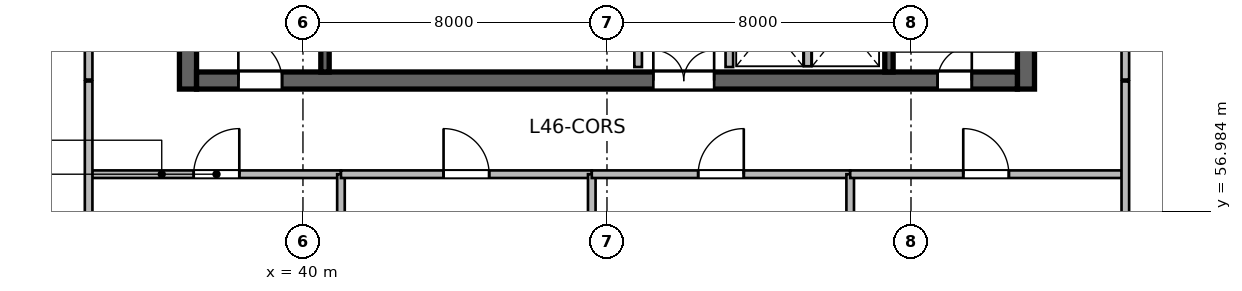
"""IFC4 building model, lengths in metres.
Left out: names, types, materials, properties, quantities, classifications, styles, units other than length and angle.
Written with IfcOpenShell. Run it as: python <this file> out.ifc"""

import sys

from ifc_helpers import new_model, si_unit, direction, frame, frame_2d, origin, place, context, subcontext, project, spatial, rectangle, extrude, source, transform, mapped, element, fill, save


model = new_model("IFC4")
c1 = context("Model", 3, precision=1e-05, world=origin(), true_north=direction((0.0, 1.0)))
c2 = subcontext(c1, "Body", "Model", "MODEL_VIEW")
j1 = project(units=[si_unit("LENGTHUNIT", "METRE"), si_unit("PLANEANGLEUNIT", "RADIAN")], contexts=[c1])
p1 = place(None, origin())
s1 = spatial("IfcSite", under=j1, at=p1, CompositionType="ELEMENT")
p2 = place(p1, origin())
s2 = spatial("IfcBuilding", under=s1, at=p2, CompositionType="ELEMENT")
p3 = place(p2, frame((0.0, 0.0, 189.6)))
s3 = spatial("IfcBuildingStorey", under=s2, at=p3, CompositionType="ELEMENT", Elevation=189.6)
m1 = source(origin(), c2, "Body", "SweptSolid", [
    extrude(rectangle(XDim=12.0, YDim=0.45, at=frame_2d((6.0, 0.0))), origin(), (0.0, 0.0, 1.0), 4.8),
])
for number, where, z_axis, x_axis in (
    (1, (36.975, 60.2, 0.0), (0.0, 0.0, 1.0), (0.0, 1.0, 0.0)),
    (2, (59.025, 60.2, 0.0), (0.0, 0.0, 1.0), (0.0, 1.0, 0.0)),
):
    element("IfcWall", number, at=place(p3, frame(where, z_axis=z_axis, x_axis=x_axis)), inside=s3, PredefinedType="SHEAR", context=c2, shape_type="MappedRepresentation", body=[
        mapped(m1, transform((0.0, 0.0, 0.0), scale=1.0)),
    ])
m2 = source(origin(), c2, "Body", "SweptSolid", [
    extrude(rectangle(XDim=21.6, YDim=0.45, at=frame_2d((10.8, 0.0))), origin(), (0.0, 0.0, 1.0), 4.8),
])
p4 = place(p3, frame((37.2, 60.425, 0.0), z_axis=(0.0, 0.0, 1.0), x_axis=(1.0, 0.0, 0.0)))
e3 = element("IfcWall", 3, at=p4, inside=s3, PredefinedType="SHEAR", context=c2, shape_type="MappedRepresentation", body=[
    mapped(m2, transform((0.0, 0.0, 0.0), scale=1.0)),
])
p5 = place(p4, frame((1.1, 0.0, 0.0)))
e4 = element("IfcOpeningElement", 4, at=p5, cuts=e3, PredefinedType="OPENING", context=c2, shape_type="SweptSolid", body=[
    extrude(rectangle(XDim=1.15, YDim=2.15, at=frame_2d((0.575, 1.075))), frame((0.0, 0.235, 0.0), z_axis=(0.0, -1.0, 0.0), x_axis=(1.0, 0.0, 0.0)), (0.0, 0.0, 1.0), 0.47),
])
p6 = place(p4, frame((19.5, 0.0, 0.0)))
e5 = element("IfcOpeningElement", 5, at=p6, cuts=e3, PredefinedType="OPENING", context=c2, shape_type="SweptSolid", body=[
    extrude(rectangle(XDim=0.9, YDim=2.1, at=frame_2d((0.45, 1.05))), frame((0.0, 0.235, 0.0), z_axis=(0.0, -1.0, 0.0), x_axis=(1.0, 0.0, 0.0)), (0.0, 0.0, 1.0), 0.47),
])
p7 = place(p4, frame((12.02, 0.0, 0.0)))
e6 = element("IfcOpeningElement", 6, at=p7, cuts=e3, PredefinedType="OPENING", context=c2, shape_type="SweptSolid", body=[
    extrude(rectangle(XDim=1.6, YDim=2.15, at=frame_2d((0.8, 1.075))), frame((0.0, 0.235, 0.0), z_axis=(0.0, -1.0, 0.0), x_axis=(1.0, 0.0, 0.0)), (0.0, 0.0, 1.0), 0.47),
])
m3 = source(origin(), c2, "Body", "SweptSolid", [
    extrude(rectangle(XDim=11.1, YDim=0.22, at=frame_2d((5.55, 0.0))), origin(), (0.0, 0.0, 1.0), 4.8),
])
p8 = place(p3, frame((40.58, 60.65, 0.0), z_axis=(0.0, 0.0, 1.0), x_axis=(0.0, 1.0, 0.0)))
e7 = element("IfcWall", 7, at=p8, inside=s3, PredefinedType="SHEAR", context=c2, shape_type="MappedRepresentation", body=[
    mapped(m3, transform((0.0, 0.0, 0.0), scale=1.0)),
])
p9 = place(p3, frame((55.42, 60.65, 0.0), z_axis=(0.0, 0.0, 1.0), x_axis=(0.0, 1.0, 0.0)))
e8 = element("IfcWall", 8, at=p9, inside=s3, PredefinedType="SHEAR", context=c2, shape_type="MappedRepresentation", body=[
    mapped(m3, transform((0.0, 0.0, 0.0), scale=1.0)),
])
p10 = place(p9, frame((9.595, 0.0, 0.0)))
e9 = element("IfcOpeningElement", 9, at=p10, cuts=e8, PredefinedType="OPENING", context=c2, shape_type="SweptSolid", body=[
    extrude(rectangle(XDim=1.15, YDim=2.15, at=frame_2d((0.575, 1.075))), frame((0.0, 0.12, 0.0), z_axis=(0.0, -1.0, 0.0), x_axis=(1.0, 0.0, 0.0)), (0.0, 0.0, 1.0), 0.24),
])
m4 = source(origin(), c2, "Body", "SweptSolid", [
    extrude(rectangle(XDim=2.24, YDim=0.2, at=frame_2d((1.12, 0.0))), origin(), (0.0, 0.0, 1.0), 4.48),
])
for number, where, z_axis, x_axis in (
    (10, (48.82, 60.78, 0.0), (0.0, 0.0, 1.0), (0.0, 1.0, 0.0)),
    (11, (51.22, 60.78, 0.0), (0.0, 0.0, 1.0), (0.0, 1.0, 0.0)),
):
    element("IfcWall", number, at=place(p3, frame(where, z_axis=z_axis, x_axis=x_axis)), inside=s3, PredefinedType="SOLIDWALL", context=c2, shape_type="MappedRepresentation", body=[
        mapped(m4, transform((0.0, 0.0, 0.0), scale=1.0)),
    ])
m5 = source(origin(), c2, "Body", "SweptSolid", [
    extrude(rectangle(XDim=2.2, YDim=0.2, at=frame_2d((1.1, 0.0))), origin(), (0.0, 0.0, 1.0), 4.48),
])
p11 = place(p3, frame((53.28, 60.8, 0.0), z_axis=(0.0, 0.0, 1.0), x_axis=(0.0, 1.0, 0.0)))
e12 = element("IfcWall", 12, at=p11, inside=s3, PredefinedType="SOLIDWALL", context=c2, shape_type="MappedRepresentation", body=[
    mapped(m5, transform((0.0, 0.0, 0.0), scale=1.0)),
])
m6 = source(origin(), c2, "Body", "SweptSolid", [
    extrude(rectangle(XDim=6.55, YDim=0.2, at=frame_2d((3.275, 0.0))), origin(), (0.0, 0.0, 1.0), 4.48),
])
p12 = place(p3, frame((34.45, 57.96, 0.0), z_axis=(0.0, 0.0, 1.0), x_axis=(1.0, 0.0, 0.0)))
e13 = element("IfcWall", 13, at=p12, inside=s3, PredefinedType="SOLIDWALL", context=c2, shape_type="MappedRepresentation", body=[
    mapped(m6, transform((0.0, 0.0, 0.0), scale=1.0)),
])
p13 = place(p12, frame((2.675, 0.0, 0.0)))
e14 = element("IfcOpeningElement", 14, at=p13, cuts=e13, PredefinedType="OPENING", context=c2, shape_type="SweptSolid", body=[
    extrude(rectangle(XDim=1.2, YDim=2.15, at=frame_2d((0.6, 1.075))), frame((0.0, 0.11, 0.0), z_axis=(0.0, -1.0, 0.0), x_axis=(1.0, 0.0, 0.0)), (0.0, 0.0, 1.0), 0.22),
])
m7 = source(origin(), c2, "Body", "SweptSolid", [
    extrude(rectangle(XDim=5.562, YDim=0.2, at=frame_2d((2.781, 0.0))), origin(), (0.0, 0.0, 1.0), 4.48),
])
p14 = place(p3, frame((41.0, 52.398, 0.0), z_axis=(0.0, 0.0, 1.0), x_axis=(0.0, 1.0, 0.0)))
e15 = element("IfcWall", 15, at=p14, inside=s3, PredefinedType="SOLIDWALL", context=c2, shape_type="MappedRepresentation", body=[
    mapped(m7, transform((0.0, 0.0, 0.0), scale=1.0)),
])
m8 = source(origin(), c2, "Body", "SweptSolid", [
    extrude(rectangle(XDim=6.6, YDim=0.2, at=frame_2d((3.3, 0.0))), origin(), (0.0, 0.0, 1.0), 3.925),
])
p15 = place(p3, frame((41.0, 57.96, 0.0), z_axis=(0.0, 0.0, 1.0), x_axis=(1.0, 0.0, 0.0)))
e16 = element("IfcWall", 16, at=p15, inside=s3, PredefinedType="SOLIDWALL", context=c2, shape_type="MappedRepresentation", body=[
    mapped(m8, transform((0.0, 0.0, 0.0), scale=1.0)),
])
p16 = place(p15, frame((2.7, 0.0, 0.0)))
e17 = element("IfcOpeningElement", 17, at=p16, cuts=e16, PredefinedType="OPENING", context=c2, shape_type="SweptSolid", body=[
    extrude(rectangle(XDim=1.2, YDim=2.15, at=frame_2d((0.6, 1.075))), frame((0.0, 0.11, 0.0), z_axis=(0.0, -1.0, 0.0), x_axis=(1.0, 0.0, 0.0)), (0.0, 0.0, 1.0), 0.22),
])
m9 = source(origin(), c2, "Body", "SweptSolid", [
    extrude(rectangle(XDim=4.173, YDim=0.2, at=frame_2d((2.086, 0.0))), origin(), (0.0, 0.0, 1.0), 4.48),
])
p17 = place(p3, frame((47.6, 53.787, 0.0), z_axis=(0.0, 0.0, 1.0), x_axis=(0.0, 1.0, 0.0)))
e18 = element("IfcWall", 18, at=p17, inside=s3, PredefinedType="SOLIDWALL", context=c2, shape_type="MappedRepresentation", body=[
    mapped(m9, transform((0.0, 0.0, 0.0), scale=1.0)),
])
m10 = source(origin(), c2, "Body", "SweptSolid", [
    extrude(rectangle(XDim=6.8, YDim=0.2, at=frame_2d((3.4, 0.0))), origin(), (0.0, 0.0, 1.0), 3.925),
])
p18 = place(p3, frame((47.6, 57.96, 0.0), z_axis=(0.0, 0.0, 1.0), x_axis=(1.0, 0.0, 0.0)))
e19 = element("IfcWall", 19, at=p18, inside=s3, PredefinedType="SOLIDWALL", context=c2, shape_type="MappedRepresentation", body=[
    mapped(m10, transform((0.0, 0.0, 0.0), scale=1.0)),
])
p19 = place(p18, frame((2.8, 0.0, 0.0)))
e20 = element("IfcOpeningElement", 20, at=p19, cuts=e19, PredefinedType="OPENING", context=c2, shape_type="SweptSolid", body=[
    extrude(rectangle(XDim=1.2, YDim=2.15, at=frame_2d((0.6, 1.075))), frame((0.0, 0.11, 0.0), z_axis=(0.0, -1.0, 0.0), x_axis=(1.0, 0.0, 0.0)), (0.0, 0.0, 1.0), 0.22),
])
m11 = source(origin(), c2, "Body", "SweptSolid", [
    extrude(rectangle(XDim=5.354, YDim=0.2, at=frame_2d((2.677, 0.0))), origin(), (0.0, 0.0, 1.0), 4.48),
])
p20 = place(p3, frame((54.4, 52.606, 0.0), z_axis=(0.0, 0.0, 1.0), x_axis=(0.0, 1.0, 0.0)))
e21 = element("IfcWall", 21, at=p20, inside=s3, PredefinedType="SOLIDWALL", context=c2, shape_type="MappedRepresentation", body=[
    mapped(m11, transform((0.0, 0.0, 0.0), scale=1.0)),
])
m12 = source(origin(), c2, "Body", "SweptSolid", [
    extrude(rectangle(XDim=7.15, YDim=0.2, at=frame_2d((3.575, 0.0))), origin(), (0.0, 0.0, 1.0), 3.925),
])
p21 = place(p3, frame((54.4, 57.96, 0.0), z_axis=(0.0, 0.0, 1.0), x_axis=(1.0, 0.0, 0.0)))
e22 = element("IfcWall", 22, at=p21, inside=s3, PredefinedType="SOLIDWALL", context=c2, shape_type="MappedRepresentation", body=[
    mapped(m12, transform((0.0, 0.0, 0.0), scale=1.0)),
])
p22 = place(p21, frame((2.975, 0.0, 0.0)))
e23 = element("IfcOpeningElement", 23, at=p22, cuts=e22, PredefinedType="OPENING", context=c2, shape_type="SweptSolid", body=[
    extrude(rectangle(XDim=1.2, YDim=2.15, at=frame_2d((0.6, 1.075))), frame((0.0, 0.11, 0.0), z_axis=(0.0, -1.0, 0.0), x_axis=(1.0, 0.0, 0.0)), (0.0, 0.0, 1.0), 0.22),
])
m13 = source(origin(), c2, "Body", "SweptSolid", [
    extrude(rectangle(XDim=12.336, YDim=0.2, at=frame_2d((6.168, 0.0))), origin(), (0.0, 0.0, 1.0), 4.48),
])
p23 = place(p3, frame((34.36, 48.064, 0.0), z_axis=(0.0, 0.0, 1.0), x_axis=(0.0, 1.0, 0.0)))
e24 = element("IfcWall", 24, at=p23, inside=s3, PredefinedType="SOLIDWALL", context=c2, shape_type="MappedRepresentation", body=[
    mapped(m13, transform((0.0, 0.0, 0.0), scale=1.0)),
])
m14 = source(origin(), c2, "Body", "SweptSolid", [
    extrude(rectangle(XDim=5.05, YDim=0.2, at=frame_2d((2.525, 0.0))), origin(), (0.0, 0.0, 1.0), 4.48),
])
p24 = place(p3, frame((34.36, 60.45, 0.0), z_axis=(0.0, 0.0, 1.0), x_axis=(0.0, 1.0, 0.0)))
e25 = element("IfcWall", 25, at=p24, inside=s3, PredefinedType="SOLIDWALL", context=c2, shape_type="MappedRepresentation", body=[
    mapped(m14, transform((0.0, 0.0, 0.0), scale=1.0)),
])
p25 = place(p24, frame((1.925, 0.0, 0.0)))
e26 = element("IfcOpeningElement", 26, at=p25, cuts=e25, PredefinedType="OPENING", context=c2, shape_type="SweptSolid", body=[
    extrude(rectangle(XDim=1.2, YDim=2.15, at=frame_2d((0.6, 1.075))), frame((0.0, 0.11, 0.0), z_axis=(0.0, -1.0, 0.0), x_axis=(1.0, 0.0, 0.0)), (0.0, 0.0, 1.0), 0.22),
])
m15 = source(origin(), c2, "Body", "SweptSolid", [
    extrude(rectangle(XDim=12.336, YDim=0.2, at=frame_2d((6.168, 0.0))), origin(), (0.0, 0.0, 1.0), 3.772),
])
p26 = place(p3, frame((61.64, 48.064, 0.0), z_axis=(0.0, 0.0, 1.0), x_axis=(0.0, 1.0, 0.0)))
e27 = element("IfcWall", 27, at=p26, inside=s3, PredefinedType="SOLIDWALL", context=c2, shape_type="MappedRepresentation", body=[
    mapped(m15, transform((0.0, 0.0, 0.0), scale=1.0)),
])
p27 = place(p3, frame((61.64, 60.45, 0.0), z_axis=(0.0, 0.0, 1.0), x_axis=(0.0, 1.0, 0.0)))
e28 = element("IfcWall", 28, at=p27, inside=s3, PredefinedType="SOLIDWALL", context=c2, shape_type="MappedRepresentation", body=[
    mapped(m14, transform((0.0, 0.0, 0.0), scale=1.0)),
])
p28 = place(p27, frame((1.925, 0.0, 0.0)))
e29 = element("IfcOpeningElement", 29, at=p28, cuts=e28, PredefinedType="OPENING", context=c2, shape_type="SweptSolid", body=[
    extrude(rectangle(XDim=1.2, YDim=2.15, at=frame_2d((0.6, 1.075))), frame((0.0, 0.11, 0.0), z_axis=(0.0, -1.0, 0.0), x_axis=(1.0, 0.0, 0.0)), (0.0, 0.0, 1.0), 0.22),
])
m16 = source(origin(), c2, "Body", "SweptSolid", [
    extrude(rectangle(XDim=1.15, YDim=2.15, at=frame_2d((0.575, 1.075))), frame((0.0, 0.025, 0.0), z_axis=(0.0, -1.0, 0.0), x_axis=(1.0, 0.0, 0.0)), (0.0, 0.0, 1.0), 0.05),
])
p29 = place(p5, origin())
e30 = element("IfcDoor", 30, at=p29, inside=s3, OperationType="SINGLE_SWING_LEFT", PredefinedType="DOOR", context=c2, shape_type="MappedRepresentation", body=[
    mapped(m16, transform((0.0, 0.0, 0.0), scale=1.0)),
])
fill(e4, e30)
m17 = source(origin(), c2, "Body", "SweptSolid", [
    extrude(rectangle(XDim=0.9, YDim=2.1, at=frame_2d((0.45, 1.05))), frame((0.0, 0.025, 0.0), z_axis=(0.0, -1.0, 0.0), x_axis=(1.0, 0.0, 0.0)), (0.0, 0.0, 1.0), 0.05),
])
p30 = place(p6, origin())
e31 = element("IfcDoor", 31, at=p30, inside=s3, OperationType="SINGLE_SWING_RIGHT", PredefinedType="DOOR", context=c2, shape_type="MappedRepresentation", body=[
    mapped(m17, transform((0.0, 0.0, 0.0), scale=1.0)),
])
fill(e5, e31)
m18 = source(origin(), c2, "Body", "SweptSolid", [
    extrude(rectangle(XDim=1.6, YDim=2.15, at=frame_2d((0.8, 1.075))), frame((0.0, 0.025, 0.0), z_axis=(0.0, -1.0, 0.0), x_axis=(1.0, 0.0, 0.0)), (0.0, 0.0, 1.0), 0.05),
])
p31 = place(p7, origin())
e32 = element("IfcDoor", 32, at=p31, inside=s3, OperationType="DOUBLE_DOOR_SINGLE_SWING", PredefinedType="DOOR", context=c2, shape_type="MappedRepresentation", body=[
    mapped(m18, transform((0.0, 0.0, 0.0), scale=1.0)),
])
fill(e6, e32)
m19 = source(origin(), c2, "Body", "SweptSolid", [
    extrude(rectangle(XDim=1.2, YDim=2.15, at=frame_2d((0.6, 1.075))), frame((0.0, 0.025, 0.0), z_axis=(0.0, -1.0, 0.0), x_axis=(1.0, 0.0, 0.0)), (0.0, 0.0, 1.0), 0.05),
])
p32 = place(p13, origin())
e33 = element("IfcDoor", 33, at=p32, inside=s3, OperationType="SINGLE_SWING_RIGHT", PredefinedType="DOOR", context=c2, shape_type="MappedRepresentation", body=[
    mapped(m19, transform((0.0, 0.0, 0.0), scale=1.0)),
])
fill(e14, e33)
p33 = place(p16, origin())
e34 = element("IfcDoor", 34, at=p33, inside=s3, OperationType="SINGLE_SWING_LEFT", PredefinedType="DOOR", context=c2, shape_type="MappedRepresentation", body=[
    mapped(m19, transform((0.0, 0.0, 0.0), scale=1.0)),
])
fill(e17, e34)
p34 = place(p19, origin())
e35 = element("IfcDoor", 35, at=p34, inside=s3, OperationType="SINGLE_SWING_RIGHT", PredefinedType="DOOR", context=c2, shape_type="MappedRepresentation", body=[
    mapped(m19, transform((0.0, 0.0, 0.0), scale=1.0)),
])
fill(e20, e35)
p35 = place(p22, origin())
e36 = element("IfcDoor", 36, at=p35, inside=s3, OperationType="SINGLE_SWING_LEFT", PredefinedType="DOOR", context=c2, shape_type="MappedRepresentation", body=[
    mapped(m19, transform((0.0, 0.0, 0.0), scale=1.0)),
])
fill(e23, e36)
save(model, sys.argv[1])
